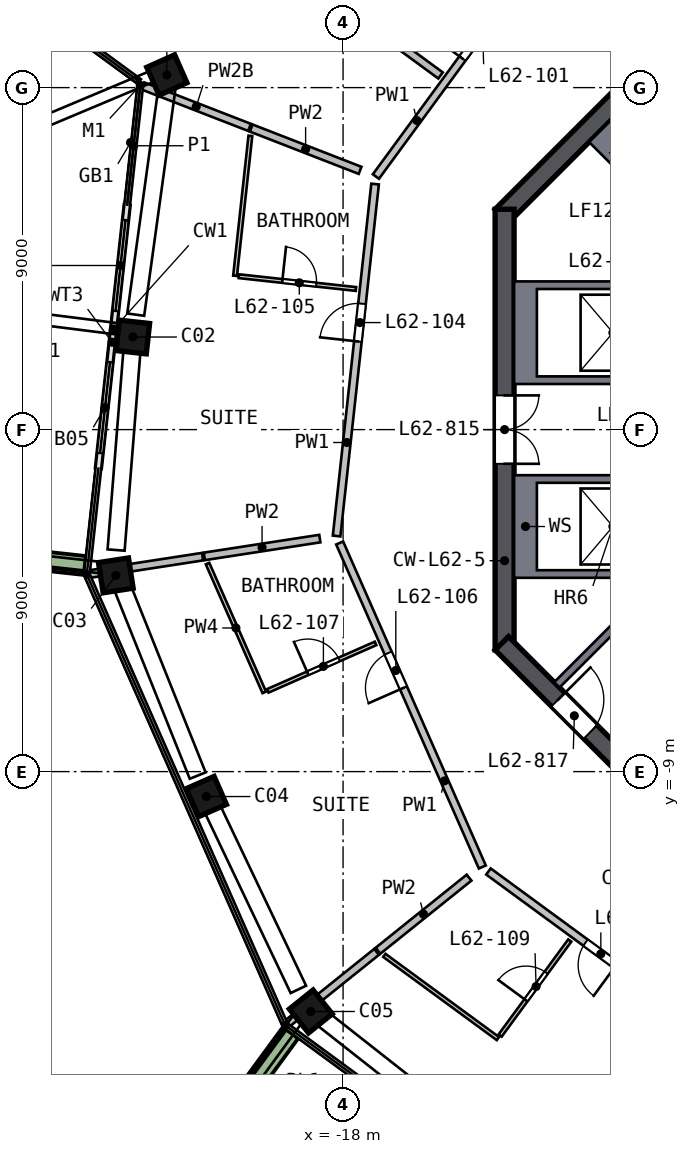
"""IFC4 building model, lengths in metres.
Left out: names, types, materials, properties, quantities, classifications, styles, units other than length and angle.
Written with IfcOpenShell. Run it as: python <this file> out.ifc"""

import sys

from ifc_helpers import new_model, si_unit, direction, frame, frame_2d, origin, origin_2d, place, context, subcontext, project, spatial, polyline, rectangle, outline, extrude, element, fill, save


model = new_model("IFC4")
c1 = context("Model", 3, precision=1e-05, world=origin(), true_north=direction((0.0, 1.0)))
c2 = subcontext(c1, "Body", "Model", "MODEL_VIEW")
j1 = project(units=[si_unit("LENGTHUNIT", "METRE"), si_unit("PLANEANGLEUNIT", "RADIAN")], contexts=[c1])
p1 = place(None, origin())
s1 = spatial("IfcSite", under=j1, at=p1, CompositionType="ELEMENT")
p2 = place(p1, origin())
s2 = spatial("IfcBuilding", under=s1, at=p2, CompositionType="ELEMENT")
p3 = place(p2, frame((0.0, 0.0, 252.5)))
s3 = spatial("IfcBuildingStorey", under=s2, at=p3, CompositionType="ELEMENT", Elevation=252.5)
p4 = place(p3, frame((-22.584, 9.461, 0.0), z_axis=(-0.044087986, -0.107787524, 0.993195902), x_axis=(-0.40787866, 0.909472019, 0.080595569)))
e1 = element("IfcColumn", 1, at=p4, inside=s3, PredefinedType="COLUMN", context=c2, shape_type="SweptSolid", body=[
    extrude(rectangle(XDim=0.8, YDim=0.8, at=origin_2d()), origin(), (0.0, 0.0, 1.0), 3.212),
])
p5 = place(p3, frame((-23.518, 2.572, 0.0), z_axis=(-0.011255095, -0.112018614, 0.993642367), x_axis=(-0.107722097, -0.987786416, -0.112578621)))
e2 = element("IfcColumn", 2, at=p5, inside=s3, PredefinedType="COLUMN", context=c2, shape_type="SweptSolid", body=[
    extrude(rectangle(XDim=0.8, YDim=0.8, at=origin_2d()), origin(), (0.0, 0.0, 1.0), 3.21),
])
p6 = place(p3, frame((-24.003, -3.698, 0.0), z_axis=(0.018549374, -0.114033037, 0.993303774), x_axis=(-0.151151624, 0.981736484, 0.115527761)))
e3 = element("IfcColumn", 3, at=p6, inside=s3, PredefinedType="COLUMN", context=c2, shape_type="SweptSolid", body=[
    extrude(rectangle(XDim=0.8, YDim=0.8, at=origin_2d()), origin(), (0.0, 0.0, 1.0), 3.211),
])
p7 = place(p3, frame((-21.653, -9.532, 0.0), z_axis=(0.046237076, -0.10266456, 0.993640841), x_axis=(0.400331749, -0.909427025, -0.112592085)))
e4 = element("IfcColumn", 4, at=p7, inside=s3, PredefinedType="COLUMN", context=c2, shape_type="SweptSolid", body=[
    extrude(rectangle(XDim=0.8, YDim=0.8, at=origin_2d()), origin(), (0.0, 0.0, 1.0), 3.21),
])
p8 = place(p3, frame((-18.938, -15.204, 0.0), z_axis=(0.07305731, -0.0894781, 0.993305743), x_axis=(-0.621660435, 0.774722887, 0.115510831)))
e5 = element("IfcColumn", 5, at=p8, inside=s3, PredefinedType="COLUMN", context=c2, shape_type="SweptSolid", body=[
    extrude(rectangle(XDim=0.8, YDim=0.8, at=origin_2d()), origin(), (0.0, 0.0, 1.0), 3.211),
])
p9 = place(p3, frame((-5.622, 13.823, 0.0), z_axis=(0.0, 0.0, 1.0), x_axis=(-0.707106781, -0.707106781, 0.0)))
e6 = element("IfcWall", 6, at=p9, inside=s3, PredefinedType="SHEAR", context=c2, shape_type="SweptSolid", body=[
    extrude(rectangle(XDim=11.598, YDim=0.5, at=frame_2d((5.799, 0.0))), origin(), (0.0, 0.0, 1.0), 3.5),
])
p10 = place(p3, frame((-13.75, 5.799, 0.0), z_axis=(0.0, 0.0, 1.0), x_axis=(0.0, -1.0, 0.0)))
e7 = element("IfcWall", 7, at=p10, inside=s3, PredefinedType="SHEAR", context=c2, shape_type="SweptSolid", body=[
    extrude(rectangle(XDim=11.598, YDim=0.5, at=frame_2d((5.799, 0.0))), origin(), (0.0, 0.0, 1.0), 3.5),
])
p11 = place(p10, frame((4.899, 0.0, 0.0)))
e8 = element("IfcOpeningElement", 8, at=p11, cuts=e7, PredefinedType="OPENING", context=c2, shape_type="SweptSolid", body=[
    extrude(rectangle(XDim=1.8, YDim=2.1, at=frame_2d((0.9, 1.05))), frame((0.0, 0.26, 0.0), z_axis=(0.0, -1.0, 0.0), x_axis=(1.0, 0.0, 0.0)), (0.0, 0.0, 1.0), 0.52),
])
p12 = place(p3, frame((-13.823, -5.622, 0.0), z_axis=(0.0, 0.0, 1.0), x_axis=(0.707106781, -0.707106781, 0.0)))
e9 = element("IfcWall", 9, at=p12, inside=s3, PredefinedType="SHEAR", context=c2, shape_type="SweptSolid", body=[
    extrude(rectangle(XDim=11.598, YDim=0.5, at=frame_2d((5.799, 0.0))), origin(), (0.0, 0.0, 1.0), 3.5),
])
p13 = place(p12, frame((2.099, 0.0, 0.0)))
e10 = element("IfcOpeningElement", 10, at=p13, cuts=e9, PredefinedType="OPENING", context=c2, shape_type="SweptSolid", body=[
    extrude(rectangle(XDim=1.2, YDim=2.1, at=frame_2d((0.6, 1.05))), frame((0.0, 0.26, 0.0), z_axis=(0.0, -1.0, 0.0), x_axis=(1.0, 0.0, 0.0)), (0.0, 0.0, 1.0), 0.52),
])
p14 = place(p3, frame((-23.681, 5.909, 0.0), z_axis=(0.0, 0.0, 1.0), x_axis=(-0.108685466, -0.994076189, 0.0)))
e11 = element("IfcWall", 11, at=p14, inside=s3, PredefinedType="SOLIDWALL", context=c2, shape_type="SweptSolid", body=[
    extrude(rectangle(XDim=3.3, YDim=0.15, at=frame_2d((1.65, 0.0))), origin(), (0.0, 0.0, 1.0), 2.525),
])
p15 = place(p14, frame((0.4, 0.0, 0.0)))
e12 = element("IfcOpeningElement", 12, at=p15, cuts=e11, PredefinedType="OPENING", context=c2, shape_type="SweptSolid", body=[
    extrude(rectangle(XDim=2.4, YDim=2.4, at=frame_2d((1.2, 1.2))), frame((0.0, 0.085, 0.0), z_axis=(0.0, -1.0, 0.0), x_axis=(1.0, 0.0, 0.0)), (0.0, 0.0, 1.0), 0.17),
])
p16 = place(p3, frame((-24.04, 2.629, 0.0), z_axis=(0.0, 0.0, 1.0), x_axis=(-0.108689527, -0.994075745, 0.0)))
e13 = element("IfcWall", 13, at=p16, inside=s3, PredefinedType="SOLIDWALL", context=c2, shape_type="SweptSolid", body=[
    extrude(rectangle(XDim=3.661, YDim=0.15, at=frame_2d((1.831, 0.0))), origin(), (0.0, 0.0, 1.0), 2.525),
])
p17 = place(p16, frame((0.861, 0.0, 0.0)))
e14 = element("IfcOpeningElement", 14, at=p17, cuts=e13, PredefinedType="OPENING", context=c2, shape_type="SweptSolid", body=[
    extrude(rectangle(XDim=2.4, YDim=2.4, at=frame_2d((1.2, 1.2))), frame((0.0, 0.085, 0.0), z_axis=(0.0, -1.0, 0.0), x_axis=(1.0, 0.0, 0.0)), (0.0, 0.0, 1.0), 0.17),
])
p18 = place(p3, frame((-27.478, -3.283, 0.0), z_axis=(0.0, 0.0, 1.0), x_axis=(0.994071997, -0.108723798, 0.0)))
e15 = element("IfcWall", 15, at=p18, inside=s3, PredefinedType="SOLIDWALL", context=c2, shape_type="SweptSolid", body=[
    extrude(rectangle(XDim=2.699, YDim=0.5, at=frame_2d((1.35, 0.0))), origin(), (0.0, 0.0, 1.0), 0.7),
])
p19 = place(p3, frame((-19.382, -15.872, 0.0), z_axis=(0.0, 0.0, 1.0), x_axis=(-0.591171745, -0.806545701, 0.0)))
e16 = element("IfcWall", 16, at=p19, inside=s3, PredefinedType="SOLIDWALL", context=c2, shape_type="SweptSolid", body=[
    extrude(rectangle(XDim=3.199, YDim=0.5, at=frame_2d((1.6, 0.0))), origin(), (0.0, 0.0, 1.0), 0.7),
])
p20 = place(p3, origin())
e17 = element("IfcWall", 17, at=p20, inside=s3, PredefinedType="SOLIDWALL", context=c2, shape_type="SweptSolid", body=[
    extrude(outline(polyline([(-13.5, 3.9), (-9.9, 3.9), (-9.9, 3.7), (-12.9, 3.7), (-12.9, 1.4), (-9.9, 1.4), (-9.9, 1.2), (-13.5, 1.2), (-13.5, 3.9)])), origin(), (0.0, 0.0, 1.0), 3.19),
])
p21 = place(p3, origin())
e18 = element("IfcWall", 18, at=p21, inside=s3, PredefinedType="SOLIDWALL", context=c2, shape_type="SweptSolid", body=[
    extrude(outline(polyline([(-13.5, -3.9), (-13.5, -1.2), (-9.9, -1.2), (-9.9, -1.4), (-12.9, -1.4), (-12.9, -3.7), (-9.9, -3.7), (-9.9, -3.9), (-13.5, -3.9)])), origin(), (0.0, 0.0, 1.0), 3.19),
])
p22 = place(p3, origin())
e19 = element("IfcWall", 19, at=p22, inside=s3, PredefinedType="SOLIDWALL", context=c2, shape_type="SweptSolid", body=[
    extrude(outline(polyline([(-11.526, 7.566), (-9.617, 9.475), (-9.192, 9.051), (-10.96, 7.283), (-8.874, 5.197), (-9.016, 5.056), (-11.526, 7.566)])), origin(), (0.0, 0.0, 1.0), 3.19),
])
p23 = place(p3, frame((-9.334, -3.677, 0.0), z_axis=(0.0, 0.0, 1.0), x_axis=(-0.707135168, -0.707078393, 0.0)))
e20 = element("IfcWall", 20, at=p23, inside=s3, PredefinedType="SOLIDWALL", context=c2, shape_type="SweptSolid", body=[
    extrude(rectangle(XDim=4.3, YDim=0.2, at=frame_2d((2.15, 0.0))), origin(), (0.0, 0.0, 1.0), 3.19),
])
p24 = place(p3, frame((-18.17, -2.8, 0.0), z_axis=(0.0, 0.0, 1.0), x_axis=(0.108699886, 0.994074612, 0.0)))
e21 = element("IfcWall", 21, at=p24, inside=s3, PredefinedType="SOLIDWALL", context=c2, shape_type="SweptSolid", body=[
    extrude(rectangle(XDim=9.316, YDim=0.2, at=frame_2d((4.658, 0.0))), origin(), (0.0, 0.0, 1.0), 3.19),
])
p25 = place(p24, frame((5.15, 0.0, 0.0)))
e22 = element("IfcOpeningElement", 22, at=p25, cuts=e21, PredefinedType="OPENING", context=c2, shape_type="SweptSolid", body=[
    extrude(rectangle(XDim=1.0, YDim=2.1, at=frame_2d((0.5, 1.05))), frame((0.0, 0.11, 0.0), z_axis=(0.0, -1.0, 0.0), x_axis=(1.0, 0.0, 0.0)), (0.0, 0.0, 1.0), 0.22),
])
p26 = place(p3, frame((-14.336, -11.51, 0.0), z_axis=(0.0, 0.0, 1.0), x_axis=(-0.402894922, 0.915246241, 0.0)))
e23 = element("IfcWall", 23, at=p26, inside=s3, PredefinedType="SOLIDWALL", context=c2, shape_type="SweptSolid", body=[
    extrude(rectangle(XDim=9.317, YDim=0.2, at=frame_2d((4.658, 0.0))), origin(), (0.0, 0.0, 1.0), 3.19),
])
p27 = place(p26, frame((5.15, 0.0, 0.0)))
e24 = element("IfcOpeningElement", 24, at=p27, cuts=e23, PredefinedType="OPENING", context=c2, shape_type="SweptSolid", body=[
    extrude(rectangle(XDim=1.0, YDim=2.1, at=frame_2d((0.5, 1.05))), frame((0.0, 0.11, 0.0), z_axis=(0.0, -1.0, 0.0), x_axis=(1.0, 0.0, 0.0)), (0.0, 0.0, 1.0), 0.22),
])
p28 = place(p3, frame((-17.136, 6.66, 0.0), z_axis=(0.0, 0.0, 1.0), x_axis=(0.591171658, 0.806545765, 0.0)))
e25 = element("IfcWall", 25, at=p28, inside=s3, PredefinedType="SOLIDWALL", context=c2, shape_type="SweptSolid", body=[
    extrude(rectangle(XDim=9.317, YDim=0.2, at=frame_2d((4.658, 0.0))), origin(), (0.0, 0.0, 1.0), 3.19),
])
p29 = place(p28, frame((3.85, 0.0, 0.0)))
e26 = element("IfcOpeningElement", 26, at=p29, cuts=e25, PredefinedType="OPENING", context=c2, shape_type="SweptSolid", body=[
    extrude(rectangle(XDim=1.8, YDim=2.1, at=frame_2d((0.9, 1.05))), frame((0.0, 0.11, 0.0), z_axis=(0.0, -1.0, 0.0), x_axis=(1.0, 0.0, 0.0)), (0.0, 0.0, 1.0), 0.22),
])
p30 = place(p3, frame((-6.66, -17.136, 0.0), z_axis=(0.0, 0.0, 1.0), x_axis=(-0.806536607, 0.591184152, 0.0)))
e27 = element("IfcWall", 27, at=p30, inside=s3, PredefinedType="SOLIDWALL", context=c2, shape_type="SweptSolid", body=[
    extrude(rectangle(XDim=9.317, YDim=0.2, at=frame_2d((4.658, 0.0))), origin(), (0.0, 0.0, 1.0), 3.19),
])
p31 = place(p30, frame((5.15, 0.0, 0.0)))
e28 = element("IfcOpeningElement", 28, at=p31, cuts=e27, PredefinedType="OPENING", context=c2, shape_type="SweptSolid", body=[
    extrude(rectangle(XDim=1.0, YDim=2.1, at=frame_2d((0.5, 1.05))), frame((0.0, 0.11, 0.0), z_axis=(0.0, -1.0, 0.0), x_axis=(1.0, 0.0, 0.0)), (0.0, 0.0, 1.0), 0.22),
])
p32 = place(p3, frame((-21.697, -3.343, 0.0), z_axis=(0.0, 0.0, 1.0), x_axis=(-0.988329484, -0.152331318, 0.0)))
e29 = element("IfcWall", 29, at=p32, inside=s3, PredefinedType="SOLIDWALL", context=c2, shape_type="SweptSolid", body=[
    extrude(rectangle(XDim=3.011, YDim=0.2, at=frame_2d((1.506, 0.0))), origin(), (0.0, 0.0, 1.0), 3.19),
])
p33 = place(p3, frame((-20.461, 7.953, 0.0), z_axis=(0.0, 0.0, 1.0), x_axis=(-0.932060953, 0.362301505, 0.0)))
e30 = element("IfcWall", 30, at=p33, inside=s3, PredefinedType="SOLIDWALL", context=c2, shape_type="SweptSolid", body=[
    extrude(rectangle(XDim=3.011, YDim=0.2, at=frame_2d((1.506, 0.0))), origin(), (0.0, 0.0, 1.0), 2.69),
])
p34 = place(p3, frame((-15.435, 9.32, 0.0), z_axis=(0.0, 0.0, 1.0), x_axis=(-0.806554833, 0.591159286, 0.0)))
e31 = element("IfcWall", 31, at=p34, inside=s3, PredefinedType="SOLIDWALL", context=c2, shape_type="SweptSolid", body=[
    extrude(rectangle(XDim=15.227, YDim=0.2, at=frame_2d((7.613, 0.0))), origin(), (0.0, 0.0, 1.0), 3.19),
])
p35 = place(p34, frame((4.75, 0.0, 0.0)))
e32 = element("IfcOpeningElement", 32, at=p35, cuts=e31, PredefinedType="OPENING", context=c2, shape_type="SweptSolid", body=[
    extrude(rectangle(XDim=1.0, YDim=2.1, at=frame_2d((0.5, 1.05))), frame((0.0, 0.11, 0.0), z_axis=(0.0, -1.0, 0.0), x_axis=(1.0, 0.0, 0.0)), (0.0, 0.0, 1.0), 0.22),
])
for number, where, z_axis, x_axis in (
    (33, (-18.612, -2.868, 0.0), (0.0, 0.0, 1.0), (-0.988, -0.152, 0.0)),
    (34, (-17.553, 6.823, 0.0), (0.0, 0.0, 1.0), (-0.932, 0.362, 0.0)),
):
    element("IfcWall", number, at=place(p3, frame(where, z_axis=z_axis, x_axis=x_axis)), inside=s3, PredefinedType="SOLIDWALL", context=c2, shape_type="SweptSolid", body=[
        extrude(rectangle(XDim=3.075, YDim=0.2, at=frame_2d((1.537, 0.0))), origin(), (0.0, 0.0, 1.0), 3.19),
    ])
p36 = place(p3, frame((-17.118, -13.744, 0.0), z_axis=(0.0, 0.0, 1.0), x_axis=(-0.779776076, -0.626058521, 0.0)))
e35 = element("IfcWall", 35, at=p36, inside=s3, PredefinedType="SOLIDWALL", context=c2, shape_type="SweptSolid", body=[
    extrude(rectangle(XDim=3.011, YDim=0.2, at=frame_2d((1.506, 0.0))), origin(), (0.0, 0.0, 1.0), 3.19),
])
p37 = place(p3, frame((-14.685, -11.79, 0.0), z_axis=(0.0, 0.0, 1.0), x_axis=(-0.77978304, -0.626049846, 0.0)))
e36 = element("IfcWall", 36, at=p37, inside=s3, PredefinedType="SOLIDWALL", context=c2, shape_type="SweptSolid", body=[
    extrude(rectangle(XDim=3.074, YDim=0.2, at=frame_2d((1.537, 0.0))), origin(), (0.0, 0.0, 1.0), 3.19),
])
for number, where, z_axis, x_axis in (
    (37, (-20.073, -6.916, 0.0), (0.0, 0.0, 1.0), (-0.403, 0.915, 0.0)),
    (38, (-20.842, 4.048, 0.0), (0.0, 0.0, 1.0), (0.109, 0.994, 0.0)),
):
    element("IfcWall", number, at=place(p3, frame(where, z_axis=z_axis, x_axis=x_axis)), inside=s3, PredefinedType="PARTITIONING", context=c2, shape_type="SweptSolid", body=[
        extrude(rectangle(XDim=3.704, YDim=0.1, at=frame_2d((1.852, 0.0))), origin(), (0.0, 0.0, 1.0), 3.19),
    ])
p38 = place(p3, frame((-20.742, 4.037, 0.0), z_axis=(0.0, 0.0, 1.0), x_axis=(0.994076213, -0.108685246, 0.0)))
e39 = element("IfcWall", 39, at=p38, inside=s3, PredefinedType="PARTITIONING", context=c2, shape_type="SweptSolid", body=[
    extrude(rectangle(XDim=3.1, YDim=0.1, at=frame_2d((1.55, 0.0))), origin(), (0.0, 0.0, 1.0), 3.19),
])
p39 = place(p38, frame((1.15, 0.0, 0.0)))
e40 = element("IfcOpeningElement", 40, at=p39, cuts=e39, PredefinedType="OPENING", context=c2, shape_type="SweptSolid", body=[
    extrude(rectangle(XDim=0.9, YDim=2.1, at=frame_2d((0.45, 1.05))), frame((0.0, 0.06, 0.0), z_axis=(0.0, -1.0, 0.0), x_axis=(1.0, 0.0, 0.0)), (0.0, 0.0, 1.0), 0.12),
])
p40 = place(p3, frame((-19.982, -6.875, 0.0), z_axis=(0.0, 0.0, 1.0), x_axis=(0.915247669, 0.402891678, 0.0)))
e41 = element("IfcWall", 41, at=p40, inside=s3, PredefinedType="PARTITIONING", context=c2, shape_type="SweptSolid", body=[
    extrude(rectangle(XDim=3.1, YDim=0.1, at=frame_2d((1.55, 0.0))), origin(), (0.0, 0.0, 1.0), 3.19),
])
p41 = place(p40, frame((1.15, 0.0, 0.0)))
e42 = element("IfcOpeningElement", 42, at=p41, cuts=e41, PredefinedType="OPENING", context=c2, shape_type="SweptSolid", body=[
    extrude(rectangle(XDim=0.9, YDim=2.1, at=frame_2d((0.45, 1.05))), frame((0.0, 0.06, 0.0), z_axis=(0.0, -1.0, 0.0), x_axis=(1.0, 0.0, 0.0)), (0.0, 0.0, 1.0), 0.12),
])
p42 = place(p3, frame((-13.926, -16.026, 0.0), z_axis=(0.0, 0.0, 1.0), x_axis=(-0.806587268, 0.59111503, 0.0)))
e43 = element("IfcWall", 43, at=p42, inside=s3, PredefinedType="PARTITIONING", context=c2, shape_type="SweptSolid", body=[
    extrude(rectangle(XDim=3.704, YDim=0.1, at=frame_2d((1.852, 0.0))), origin(), (0.0, 0.0, 1.0), 3.19),
])
p43 = place(p3, frame((-13.867, -15.945, 0.0), z_axis=(0.0, 0.0, 1.0), x_axis=(0.591155368, 0.806557704, 0.0)))
e44 = element("IfcWall", 44, at=p43, inside=s3, PredefinedType="PARTITIONING", context=c2, shape_type="SweptSolid", body=[
    extrude(rectangle(XDim=3.1, YDim=0.1, at=frame_2d((1.55, 0.0))), origin(), (0.0, 0.0, 1.0), 3.19),
])
p44 = place(p43, frame((1.15, 0.0, 0.0)))
e45 = element("IfcOpeningElement", 45, at=p44, cuts=e44, PredefinedType="OPENING", context=c2, shape_type="SweptSolid", body=[
    extrude(rectangle(XDim=0.9, YDim=2.1, at=frame_2d((0.45, 1.05))), frame((0.0, 0.06, 0.0), z_axis=(0.0, -1.0, 0.0), x_axis=(1.0, 0.0, 0.0)), (0.0, 0.0, 1.0), 0.12),
])
p45 = place(p15, origin())
e46 = element("IfcDoor", 46, at=p45, inside=s3, OperationType="SLIDING_TO_RIGHT", PredefinedType="DOOR", context=c2, shape_type="SweptSolid", body=[
    extrude(rectangle(XDim=2.4, YDim=2.4, at=frame_2d((1.2, 1.2))), frame((0.0, 0.025, 0.0), z_axis=(0.0, -1.0, 0.0), x_axis=(1.0, 0.0, 0.0)), (0.0, 0.0, 1.0), 0.05),
])
fill(e12, e46)
p46 = place(p17, origin())
e47 = element("IfcDoor", 47, at=p46, inside=s3, OperationType="SLIDING_TO_LEFT", PredefinedType="DOOR", context=c2, shape_type="SweptSolid", body=[
    extrude(rectangle(XDim=2.4, YDim=2.4, at=frame_2d((1.2, 1.2))), frame((0.0, 0.025, 0.0), z_axis=(0.0, -1.0, 0.0), x_axis=(1.0, 0.0, 0.0)), (0.0, 0.0, 1.0), 0.05),
])
fill(e14, e47)
p47 = place(p11, origin())
e48 = element("IfcDoor", 48, at=p47, inside=s3, OperationType="DOUBLE_DOOR_SINGLE_SWING", PredefinedType="DOOR", context=c2, shape_type="SweptSolid", body=[
    extrude(rectangle(XDim=1.8, YDim=2.1, at=frame_2d((0.9, 1.05))), frame((0.0, 0.025, 0.0), z_axis=(0.0, -1.0, 0.0), x_axis=(1.0, 0.0, 0.0)), (0.0, 0.0, 1.0), 0.05),
])
fill(e8, e48)
p48 = place(p13, origin())
e49 = element("IfcDoor", 49, at=p48, inside=s3, OperationType="SINGLE_SWING_LEFT", PredefinedType="DOOR", context=c2, shape_type="SweptSolid", body=[
    extrude(rectangle(XDim=1.2, YDim=2.1, at=frame_2d((0.6, 1.05))), frame((0.0, 0.025, 0.0), z_axis=(0.0, -1.0, 0.0), x_axis=(1.0, 0.0, 0.0)), (0.0, 0.0, 1.0), 0.05),
])
fill(e10, e49)
p49 = place(p29, origin())
e50 = element("IfcDoor", 50, at=p49, inside=s3, OperationType="DOUBLE_DOOR_SINGLE_SWING", PredefinedType="DOOR", context=c2, shape_type="SweptSolid", body=[
    extrude(rectangle(XDim=1.8, YDim=2.1, at=frame_2d((0.9, 1.05))), frame((0.0, 0.025, 0.0), z_axis=(0.0, -1.0, 0.0), x_axis=(1.0, 0.0, 0.0)), (0.0, 0.0, 1.0), 0.05),
])
fill(e26, e50)
p50 = place(p25, origin())
e51 = element("IfcDoor", 51, at=p50, inside=s3, OperationType="SINGLE_SWING_LEFT", PredefinedType="DOOR", context=c2, shape_type="SweptSolid", body=[
    extrude(rectangle(XDim=1.0, YDim=2.1, at=frame_2d((0.5, 1.05))), frame((0.0, 0.025, 0.0), z_axis=(0.0, -1.0, 0.0), x_axis=(1.0, 0.0, 0.0)), (0.0, 0.0, 1.0), 0.05),
])
fill(e22, e51)
p51 = place(p39, origin())
e52 = element("IfcDoor", 52, at=p51, inside=s3, OperationType="SINGLE_SWING_LEFT", PredefinedType="DOOR", context=c2, shape_type="SweptSolid", body=[
    extrude(rectangle(XDim=0.9, YDim=2.1, at=frame_2d((0.45, 1.05))), frame((0.0, 0.025, 0.0), z_axis=(0.0, -1.0, 0.0), x_axis=(1.0, 0.0, 0.0)), (0.0, 0.0, 1.0), 0.05),
])
fill(e40, e52)
p52 = place(p27, origin())
e53 = element("IfcDoor", 53, at=p52, inside=s3, OperationType="SINGLE_SWING_LEFT", PredefinedType="DOOR", context=c2, shape_type="SweptSolid", body=[
    extrude(rectangle(XDim=1.0, YDim=2.1, at=frame_2d((0.5, 1.05))), frame((0.0, 0.025, 0.0), z_axis=(0.0, -1.0, 0.0), x_axis=(1.0, 0.0, 0.0)), (0.0, 0.0, 1.0), 0.05),
])
fill(e24, e53)
p53 = place(p41, origin())
e54 = element("IfcDoor", 54, at=p53, inside=s3, OperationType="SINGLE_SWING_LEFT", PredefinedType="DOOR", context=c2, shape_type="SweptSolid", body=[
    extrude(rectangle(XDim=0.9, YDim=2.1, at=frame_2d((0.45, 1.05))), frame((0.0, 0.025, 0.0), z_axis=(0.0, -1.0, 0.0), x_axis=(1.0, 0.0, 0.0)), (0.0, 0.0, 1.0), 0.05),
])
fill(e42, e54)
p54 = place(p31, origin())
e55 = element("IfcDoor", 55, at=p54, inside=s3, OperationType="SINGLE_SWING_LEFT", PredefinedType="DOOR", context=c2, shape_type="SweptSolid", body=[
    extrude(rectangle(XDim=1.0, YDim=2.1, at=frame_2d((0.5, 1.05))), frame((0.0, 0.025, 0.0), z_axis=(0.0, -1.0, 0.0), x_axis=(1.0, 0.0, 0.0)), (0.0, 0.0, 1.0), 0.05),
])
fill(e28, e55)
p55 = place(p44, origin())
e56 = element("IfcDoor", 56, at=p55, inside=s3, OperationType="SINGLE_SWING_LEFT", PredefinedType="DOOR", context=c2, shape_type="SweptSolid", body=[
    extrude(rectangle(XDim=0.9, YDim=2.1, at=frame_2d((0.45, 1.05))), frame((0.0, 0.025, 0.0), z_axis=(0.0, -1.0, 0.0), x_axis=(1.0, 0.0, 0.0)), (0.0, 0.0, 1.0), 0.05),
])
fill(e45, e56)
save(model, sys.argv[1])
